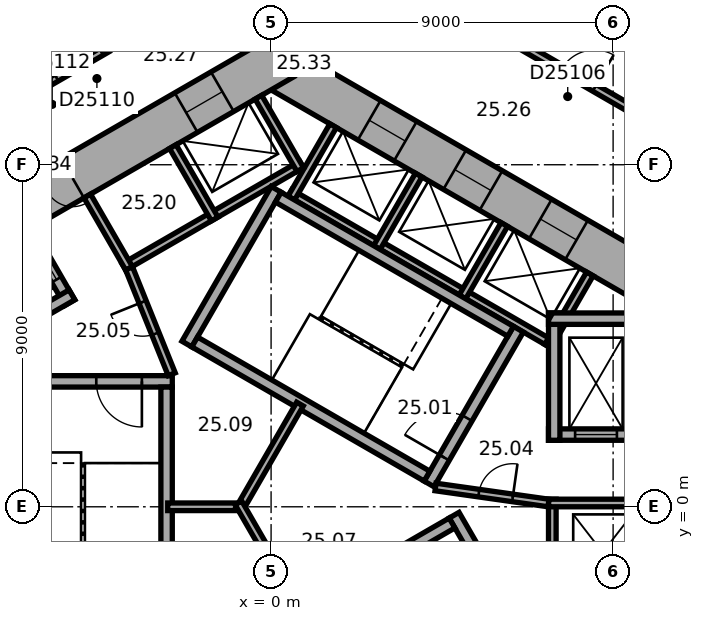
"""IFC4 building model, lengths in metres.
Left out: names, types, materials, properties, quantities, classifications, styles, units other than length and angle.
Written with IfcOpenShell. Run it as: python <this file> out.ifc"""

import sys

from ifc_helpers import new_model, si_unit, direction, frame, frame_2d, origin, place, context, subcontext, project, spatial, rectangle, extrude, element, fill, save


model = new_model("IFC4")
c1 = context("Model", 3, precision=1e-05, world=origin(), true_north=direction((0.0, 1.0)))
c2 = subcontext(c1, "Body", "Model", "MODEL_VIEW")
j1 = project(units=[si_unit("LENGTHUNIT", "METRE"), si_unit("PLANEANGLEUNIT", "RADIAN")], contexts=[c1])
p1 = place(None, origin())
s1 = spatial("IfcSite", under=j1, at=p1, CompositionType="ELEMENT")
p2 = place(p1, origin())
s2 = spatial("IfcBuilding", under=s1, at=p2, CompositionType="ELEMENT")
p3 = place(p2, frame((0.0, 0.0, 106.7)))
s3 = spatial("IfcBuildingStorey", under=s2, at=p3, CompositionType="ELEMENT", Elevation=106.7)
p4 = place(p3, frame((10.4, 5.658, 0.0), z_axis=(0.0, 0.0, 1.0), x_axis=(-0.866021384402, 0.500006961711, 0.0)))
e1 = element("IfcWall", 1, at=p4, inside=s3, PredefinedType="SHEAR", context=c2, shape_type="SweptSolid", body=[
    extrude(rectangle(XDim=12.355, YDim=1.2, at=frame_2d((6.178, 0.0))), origin(), (0.0, 0.0, 1.0), 3.3),
])
p5 = place(p4, frame((2.728, 0.0, 0.0)))
e2 = element("IfcOpeningElement", 2, at=p5, cuts=e1, PredefinedType="OPENING", context=c2, shape_type="SweptSolid", body=[
    extrude(rectangle(XDim=1.1, YDim=2.1, at=frame_2d((0.55, 1.05))), frame((0.0, 0.61, 0.0), z_axis=(0.0, -1.0, 0.0), x_axis=(1.0, 0.0, 0.0)), (0.0, 0.0, 1.0), 1.22),
])
p6 = place(p4, frame((5.328, 0.0, 0.0)))
e3 = element("IfcOpeningElement", 3, at=p6, cuts=e1, PredefinedType="OPENING", context=c2, shape_type="SweptSolid", body=[
    extrude(rectangle(XDim=1.1, YDim=2.1, at=frame_2d((0.55, 1.05))), frame((0.0, 0.61, 0.0), z_axis=(0.0, -1.0, 0.0), x_axis=(1.0, 0.0, 0.0)), (0.0, 0.0, 1.0), 1.22),
])
p7 = place(p4, frame((7.928, 0.0, 0.0)))
e4 = element("IfcOpeningElement", 4, at=p7, cuts=e1, PredefinedType="OPENING", context=c2, shape_type="SweptSolid", body=[
    extrude(rectangle(XDim=1.1, YDim=2.1, at=frame_2d((0.55, 1.05))), frame((0.0, 0.61, 0.0), z_axis=(0.0, -1.0, 0.0), x_axis=(1.0, 0.0, 0.0)), (0.0, 0.0, 1.0), 1.22),
])
p8 = place(p3, frame((0.3, 11.836, 0.0), z_axis=(0.0, 0.0, 1.0), x_axis=(-0.866021384402, -0.500006961711, 0.0)))
e5 = element("IfcWall", 5, at=p8, inside=s3, PredefinedType="SHEAR", context=c2, shape_type="SweptSolid", body=[
    extrude(rectangle(XDim=12.355, YDim=1.2, at=frame_2d((6.178, 0.0))), origin(), (0.0, 0.0, 1.0), 3.3),
])
p9 = place(p8, frame((6.378, 0.0, 0.0)))
e6 = element("IfcOpeningElement", 6, at=p9, cuts=e5, PredefinedType="OPENING", context=c2, shape_type="SweptSolid", body=[
    extrude(rectangle(XDim=1.5, YDim=2.1, at=frame_2d((0.75, 1.05))), frame((0.0, 0.61, 0.0), z_axis=(0.0, -1.0, 0.0), x_axis=(1.0, 0.0, 0.0)), (0.0, 0.0, 1.0), 1.22),
])
p10 = place(p8, frame((1.828, 0.0, 0.0)))
e7 = element("IfcOpeningElement", 7, at=p10, cuts=e5, PredefinedType="OPENING", context=c2, shape_type="SweptSolid", body=[
    extrude(rectangle(XDim=1.1, YDim=2.1, at=frame_2d((0.55, 1.05))), frame((0.0, 0.61, 0.0), z_axis=(0.0, -1.0, 0.0), x_axis=(1.0, 0.0, 0.0)), (0.0, 0.0, 1.0), 1.22),
])
p11 = place(p3, frame((7.4, -5.2, 0.0), z_axis=(0.0, 0.0, 1.0), x_axis=(0.0, 1.0, 0.0)))
e8 = element("IfcWall", 8, at=p11, inside=s3, PredefinedType="PARTITIONING", context=c2, shape_type="SweptSolid", body=[
    extrude(rectangle(XDim=5.4, YDim=0.2, at=frame_2d((2.7, 0.0))), origin(), (0.0, 0.0, 1.0), 3.05),
])
p12 = place(p3, frame((7.3, 0.1, 0.0), z_axis=(0.0, 0.0, 1.0), x_axis=(1.0, 0.0, 0.0)))
e9 = element("IfcWall", 9, at=p12, inside=s3, PredefinedType="PARTITIONING", context=c2, shape_type="SweptSolid", body=[
    extrude(rectangle(XDim=2.2, YDim=0.2, at=frame_2d((1.1, 0.0))), origin(), (0.0, 0.0, 1.0), 3.05),
])
p13 = place(p3, frame((7.424, 4.259, 0.0), z_axis=(0.0, 0.0, 1.0), x_axis=(-0.866026010844, 0.49999894854, 0.0)))
e10 = element("IfcWall", 10, at=p13, inside=s3, PredefinedType="PARTITIONING", context=c2, shape_type="SweptSolid", body=[
    extrude(rectangle(XDim=8.0, YDim=0.2, at=frame_2d((4.0, 0.0))), origin(), (0.0, 0.0, 1.0), 3.05),
])
for number, where, z_axis, x_axis in (
    (11, (7.287, 4.222, 0.0), (0.0, 0.0, 1.0), (0.5, 0.866, 0.0)),
    (12, (5.036, 5.522, 0.0), (0.0, 0.0, 1.0), (0.5, 0.866, 0.0)),
    (13, (2.784, 6.822, 0.0), (0.0, 0.0, 1.0), (0.5, 0.866, 0.0)),
    (14, (0.532, 8.122, 0.0), (0.0, 0.0, 1.0), (0.5, 0.866, 0.0)),
):
    element("IfcWall", number, at=place(p3, frame(where, z_axis=z_axis, x_axis=x_axis)), inside=s3, PredefinedType="PARTITIONING", context=c2, shape_type="SweptSolid", body=[
        extrude(rectangle(XDim=2.2, YDim=0.2, at=frame_2d((1.1, 0.0))), origin(), (0.0, 0.0, 1.0), 3.05),
    ])
p14 = place(p3, frame((0.803, 9.009, 0.0), z_axis=(0.0, 0.0, 1.0), x_axis=(-0.866028230842, -0.499995103361, 0.0)))
e15 = element("IfcWall", 15, at=p14, inside=s3, PredefinedType="PARTITIONING", context=c2, shape_type="SweptSolid", body=[
    extrude(rectangle(XDim=5.4, YDim=0.2, at=frame_2d((2.7, 0.0))), origin(), (0.0, 0.0, 1.0), 3.05),
])
p15 = place(p3, frame((0.767, 8.872, 0.0), z_axis=(0.0, 0.0, 1.0), x_axis=(-0.499994660107, 0.866028486751, 0.0)))
e16 = element("IfcWall", 16, at=p15, inside=s3, PredefinedType="PARTITIONING", context=c2, shape_type="SweptSolid", body=[
    extrude(rectangle(XDim=2.2, YDim=0.2, at=frame_2d((1.1, 0.0))), origin(), (0.0, 0.0, 1.0), 3.05),
])
for number, where, z_axis, x_axis in (
    (17, (-1.485, 7.572, 0.0), (0.0, 0.0, 1.0), (-0.5, 0.866, 0.0)),
    (18, (-3.737, 6.272, 0.0), (0.0, 0.0, 1.0), (-0.5, 0.866, 0.0)),
):
    element("IfcWall", number, at=place(p3, frame(where, z_axis=z_axis, x_axis=x_axis)), inside=s3, PredefinedType="PARTITIONING", context=c2, shape_type="SweptSolid", body=[
        extrude(rectangle(XDim=2.2, YDim=0.2, at=frame_2d((1.1, 0.0))), origin(), (0.0, 0.0, 1.0), 3.05),
    ])
p16 = place(p3, frame((4.158, 0.602, 0.0), z_axis=(0.0, 0.0, 1.0), x_axis=(0.499977259774, 0.866038532462, 0.0)))
e19 = element("IfcWall", 19, at=p16, inside=s3, PredefinedType="SHEAR", context=c2, shape_type="SweptSolid", body=[
    extrude(rectangle(XDim=4.7, YDim=0.3, at=frame_2d((2.35, 0.0))), origin(), (0.0, 0.0, 1.0), 3.05),
])
p17 = place(p16, frame((0.8, 0.0, 0.0)))
e20 = element("IfcOpeningElement", 20, at=p17, cuts=e19, PredefinedType="OPENING", context=c2, shape_type="SweptSolid", body=[
    extrude(rectangle(XDim=1.2, YDim=2.1, at=frame_2d((0.6, 1.05))), frame((0.0, 0.16, 0.0), z_axis=(0.0, -1.0, 0.0), x_axis=(1.0, 0.0, 0.0)), (0.0, 0.0, 1.0), 0.32),
])
p18 = place(p3, frame((-2.216, 4.282, 0.0), z_axis=(0.0, 0.0, 1.0), x_axis=(0.499977259774, 0.866038532462, 0.0)))
e21 = element("IfcWall", 21, at=p18, inside=s3, PredefinedType="SHEAR", context=c2, shape_type="SweptSolid", body=[
    extrude(rectangle(XDim=4.7, YDim=0.3, at=frame_2d((2.35, 0.0))), origin(), (0.0, 0.0, 1.0), 3.05),
])
for number, where, z_axis, x_axis in (
    (22, (4.103, 0.807, 0.0), (0.0, 0.0, 1.0), (-0.866, 0.5, 0.0)),
    (23, (6.303, 4.617, 0.0), (0.0, 0.0, 1.0), (-0.866, 0.5, 0.0)),
):
    element("IfcWall", number, at=place(p3, frame(where, z_axis=z_axis, x_axis=x_axis)), inside=s3, PredefinedType="SHEAR", context=c2, shape_type="SweptSolid", body=[
        extrude(rectangle(XDim=7.06, YDim=0.3, at=frame_2d((3.53, 0.0))), origin(), (0.0, 0.0, 1.0), 3.05),
    ])
p19 = place(p3, frame((-2.6, 3.3, 0.0), z_axis=(0.0, 0.0, 1.0), x_axis=(-1.0, 0.0, 0.0)))
e24 = element("IfcWall", 24, at=p19, inside=s3, PredefinedType="SHEAR", context=c2, shape_type="SweptSolid", body=[
    extrude(rectangle(XDim=4.7, YDim=0.3, at=frame_2d((2.35, 0.0))), origin(), (0.0, 0.0, 1.0), 3.05),
])
p20 = place(p19, frame((0.8, 0.0, 0.0)))
e25 = element("IfcOpeningElement", 25, at=p20, cuts=e24, PredefinedType="OPENING", context=c2, shape_type="SweptSolid", body=[
    extrude(rectangle(XDim=1.2, YDim=2.1, at=frame_2d((0.6, 1.05))), frame((0.0, 0.16, 0.0), z_axis=(0.0, -1.0, 0.0), x_axis=(1.0, 0.0, 0.0)), (0.0, 0.0, 1.0), 0.32),
])
p21 = place(p3, frame((-2.75, 3.15, 0.0), z_axis=(0.0, 0.0, 1.0), x_axis=(0.0, -1.0, 0.0)))
e26 = element("IfcWall", 26, at=p21, inside=s3, PredefinedType="SHEAR", context=c2, shape_type="SweptSolid", body=[
    extrude(rectangle(XDim=7.06, YDim=0.3, at=frame_2d((3.53, 0.0))), origin(), (0.0, 0.0, 1.0), 3.05),
])
p22 = place(p3, frame((4.816, -0.222, 0.0), z_axis=(0.0, 0.0, 1.0), x_axis=(0.499977259774, -0.866038532462, 0.0)))
e27 = element("IfcWall", 27, at=p22, inside=s3, PredefinedType="SHEAR", context=c2, shape_type="SweptSolid", body=[
    extrude(rectangle(XDim=4.7, YDim=0.3, at=frame_2d((2.35, 0.0))), origin(), (0.0, 0.0, 1.0), 3.05),
])
p23 = place(p3, frame((-1.353, -3.957, 0.0), z_axis=(0.0, 0.0, 1.0), x_axis=(0.866027801685, 0.499995846692, 0.0)))
e28 = element("IfcWall", 28, at=p23, inside=s3, PredefinedType="SHEAR", context=c2, shape_type="SweptSolid", body=[
    extrude(rectangle(XDim=7.06, YDim=0.3, at=frame_2d((3.53, 0.0))), origin(), (0.0, 0.0, 1.0), 3.05),
])
p24 = place(p3, frame((7.3, 1.9, 0.0), z_axis=(0.0, 0.0, 1.0), x_axis=(1.0, 0.0, 0.0)))
e29 = element("IfcWall", 29, at=p24, inside=s3, PredefinedType="SHEAR", context=c2, shape_type="SweptSolid", body=[
    extrude(rectangle(XDim=2.2, YDim=0.3, at=frame_2d((1.1, 0.0))), origin(), (0.0, 0.0, 1.0), 3.05),
])
p25 = place(p24, frame((0.7, 0.0, 0.0)))
e30 = element("IfcOpeningElement", 30, at=p25, cuts=e29, PredefinedType="OPENING", context=c2, shape_type="SweptSolid", body=[
    extrude(rectangle(XDim=1.1, YDim=2.1, at=frame_2d((0.55, 1.05))), frame((0.0, 0.16, 0.0), z_axis=(0.0, -1.0, 0.0), x_axis=(1.0, 0.0, 0.0)), (0.0, 0.0, 1.0), 0.32),
])
p26 = place(p3, frame((7.45, 1.75, 0.0), z_axis=(0.0, 0.0, 1.0), x_axis=(0.0, 1.0, 0.0)))
e31 = element("IfcWall", 31, at=p26, inside=s3, PredefinedType="SHEAR", context=c2, shape_type="SweptSolid", body=[
    extrude(rectangle(XDim=3.35, YDim=0.3, at=frame_2d((1.675, 0.0))), origin(), (0.0, 0.0, 1.0), 3.05),
])
p27 = place(p3, frame((7.3, 4.95, 0.0), z_axis=(0.0, 0.0, 1.0), x_axis=(1.0, 0.0, 0.0)))
e32 = element("IfcWall", 32, at=p27, inside=s3, PredefinedType="SHEAR", context=c2, shape_type="SweptSolid", body=[
    extrude(rectangle(XDim=2.2, YDim=0.3, at=frame_2d((1.1, 0.0))), origin(), (0.0, 0.0, 1.0), 3.05),
])
p28 = place(p3, frame((4.327, 0.521, 0.0), z_axis=(0.0, 0.0, 1.0), x_axis=(0.990124376366, -0.14019172346, 0.0)))
e33 = element("IfcWall", 33, at=p28, inside=s3, PredefinedType="PARTITIONING", context=c2, shape_type="SweptSolid", body=[
    extrude(rectangle(XDim=3.002, YDim=0.2, at=frame_2d((1.501, 0.0))), origin(), (0.0, 0.0, 1.0), 3.05),
])
p29 = place(p28, frame((1.15, 0.0, 0.0)))
e34 = element("IfcOpeningElement", 34, at=p29, cuts=e33, PredefinedType="OPENING", context=c2, shape_type="SweptSolid", body=[
    extrude(rectangle(XDim=0.9, YDim=2.1, at=frame_2d((0.45, 1.05))), frame((0.0, 0.11, 0.0), z_axis=(0.0, -1.0, 0.0), x_axis=(1.0, 0.0, 0.0)), (0.0, 0.0, 1.0), 0.22),
])
p30 = place(p3, frame((-5.295, 5.372, 0.0), z_axis=(0.0, 0.0, 1.0), x_axis=(-0.500077893725, 0.86598042715, 0.0)))
e35 = element("IfcWall", 35, at=p30, inside=s3, PredefinedType="SHEAR", context=c2, shape_type="SweptSolid", body=[
    extrude(rectangle(XDim=2.2, YDim=0.3, at=frame_2d((1.1, 0.0))), origin(), (0.0, 0.0, 1.0), 3.05),
])
p31 = place(p30, frame((0.7, 0.0, 0.0)))
e36 = element("IfcOpeningElement", 36, at=p31, cuts=e35, PredefinedType="OPENING", context=c2, shape_type="SweptSolid", body=[
    extrude(rectangle(XDim=1.1, YDim=2.1, at=frame_2d((0.55, 1.05))), frame((0.0, 0.16, 0.0), z_axis=(0.0, -1.0, 0.0), x_axis=(1.0, 0.0, 0.0)), (0.0, 0.0, 1.0), 0.32),
])
p32 = place(p3, frame((-5.24, 5.577, 0.0), z_axis=(0.0, 0.0, 1.0), x_axis=(-0.866014461049, -0.500018952895, 0.0)))
e37 = element("IfcWall", 37, at=p32, inside=s3, PredefinedType="SHEAR", context=c2, shape_type="SweptSolid", body=[
    extrude(rectangle(XDim=3.35, YDim=0.3, at=frame_2d((1.675, 0.0))), origin(), (0.0, 0.0, 1.0), 3.05),
])
p33 = place(p3, frame((-2.615, 3.487, 0.0), z_axis=(0.0, 0.0, 1.0), x_axis=(-0.373576831041, 0.92759924068, 0.0)))
e38 = element("IfcWall", 38, at=p33, inside=s3, PredefinedType="PARTITIONING", context=c2, shape_type="SweptSolid", body=[
    extrude(rectangle(XDim=3.002, YDim=0.2, at=frame_2d((1.501, 0.0))), origin(), (0.0, 0.0, 1.0), 3.05),
])
p34 = place(p33, frame((1.15, 0.0, 0.0)))
e39 = element("IfcOpeningElement", 39, at=p34, cuts=e38, PredefinedType="OPENING", context=c2, shape_type="SweptSolid", body=[
    extrude(rectangle(XDim=0.9, YDim=2.1, at=frame_2d((0.45, 1.05))), frame((0.0, 0.11, 0.0), z_axis=(0.0, -1.0, 0.0), x_axis=(1.0, 0.0, 0.0)), (0.0, 0.0, 1.0), 0.22),
])
p35 = place(p3, frame((-0.68, 0.0, 0.0), z_axis=(0.0, 0.0, 1.0), x_axis=(-1.0, 0.0, 0.0)))
e40 = element("IfcWall", 40, at=p35, inside=s3, PredefinedType="PARTITIONING", context=c2, shape_type="SweptSolid", body=[
    extrude(rectangle(XDim=2.04, YDim=0.2, at=frame_2d((1.02, 0.0))), origin(), (0.0, 0.0, 1.0), 3.05),
])
for number, where, z_axis, x_axis in (
    (41, (-0.86, -0.104, 0.0), (0.0, 0.0, 1.0), (0.5, 0.866, 0.0)),
    (42, (-0.86, 0.104, 0.0), (0.0, 0.0, 1.0), (0.5, -0.866, 0.0)),
):
    element("IfcWall", number, at=place(p3, frame(where, z_axis=z_axis, x_axis=x_axis)), inside=s3, PredefinedType="PARTITIONING", context=c2, shape_type="SweptSolid", body=[
        extrude(rectangle(XDim=3.24, YDim=0.2, at=frame_2d((1.62, 0.0))), origin(), (0.0, 0.0, 1.0), 3.05),
    ])
p36 = place(p3, frame((-10.083, 19.524, 0.0), z_axis=(0.0, 0.0, 1.0), x_axis=(0.499999662836, -0.866025598446, 0.0)))
e43 = element("IfcWall", 43, at=p36, inside=s3, PredefinedType="PARTITIONING", context=c2, shape_type="SweptSolid", body=[
    extrude(rectangle(XDim=9.25, YDim=0.2, at=frame_2d((4.625, 0.0))), origin(), (0.0, 0.0, 1.0), 2.6),
])
p37 = place(p3, frame((-4.309, 12.061, 0.0), z_axis=(0.0, 0.0, 1.0), x_axis=(-0.866020679205, -0.500008183122, 0.0)))
e44 = element("IfcWall", 44, at=p37, inside=s3, PredefinedType="PARTITIONING", context=c2, shape_type="SweptSolid", body=[
    extrude(rectangle(XDim=5.104, YDim=0.2, at=frame_2d((2.552, 0.0))), origin(), (0.0, 0.0, 1.0), 3.05),
])
p38 = place(p37, frame((0.185, 0.0, 0.0)))
e45 = element("IfcOpeningElement", 45, at=p38, cuts=e44, PredefinedType="OPENING", context=c2, shape_type="SweptSolid", body=[
    extrude(rectangle(XDim=0.9, YDim=2.1, at=frame_2d((0.45, 1.05))), frame((0.0, 0.11, 0.0), z_axis=(0.0, -1.0, 0.0), x_axis=(1.0, 0.0, 0.0)), (0.0, 0.0, 1.0), 0.22),
])
p39 = place(p37, frame((1.544, 0.0, 0.0)))
e46 = element("IfcOpeningElement", 46, at=p39, cuts=e44, PredefinedType="OPENING", context=c2, shape_type="SweptSolid", body=[
    extrude(rectangle(XDim=0.9, YDim=2.1, at=frame_2d((0.45, 1.05))), frame((0.0, 0.11, 0.0), z_axis=(0.0, -1.0, 0.0), x_axis=(1.0, 0.0, 0.0)), (0.0, 0.0, 1.0), 0.22),
])
p40 = place(p3, frame((10.885, 9.652, 0.0), z_axis=(0.0, 0.0, 1.0), x_axis=(-0.866033868542, 0.499985338323, 0.0)))
e47 = element("IfcWall", 47, at=p40, inside=s3, PredefinedType="PARTITIONING", context=c2, shape_type="SweptSolid", body=[
    extrude(rectangle(XDim=8.602, YDim=0.2, at=frame_2d((4.301, 0.0))), origin(), (0.0, 0.0, 1.0), 3.05),
])
p41 = place(p40, frame((2.739, 0.0, 0.0)))
e48 = element("IfcOpeningElement", 48, at=p41, cuts=e47, PredefinedType="OPENING", context=c2, shape_type="SweptSolid", body=[
    extrude(rectangle(XDim=1.0, YDim=2.1, at=frame_2d((0.5, 1.05))), frame((0.0, 0.11, 0.0), z_axis=(0.0, -1.0, 0.0), x_axis=(1.0, 0.0, 0.0)), (0.0, 0.0, 1.0), 0.22),
])
p42 = place(p9, origin())
e49 = element("IfcDoor", 49, at=p42, inside=s3, OperationType="DOUBLE_DOOR_SINGLE_SWING", PredefinedType="DOOR", context=c2, shape_type="SweptSolid", body=[
    extrude(rectangle(XDim=1.5, YDim=2.1, at=frame_2d((0.75, 1.05))), frame((0.0, 0.025, 0.0), z_axis=(0.0, -1.0, 0.0), x_axis=(1.0, 0.0, 0.0)), (0.0, 0.0, 1.0), 0.05),
])
fill(e6, e49)
p43 = place(p17, origin())
e50 = element("IfcDoor", 50, at=p43, inside=s3, OperationType="SINGLE_SWING_RIGHT", PredefinedType="DOOR", context=c2, shape_type="SweptSolid", body=[
    extrude(rectangle(XDim=1.2, YDim=2.1, at=frame_2d((0.6, 1.05))), frame((0.0, 0.025, 0.0), z_axis=(0.0, -1.0, 0.0), x_axis=(1.0, 0.0, 0.0)), (0.0, 0.0, 1.0), 0.05),
])
fill(e20, e50)
p44 = place(p20, origin())
e51 = element("IfcDoor", 51, at=p44, inside=s3, OperationType="SINGLE_SWING_RIGHT", PredefinedType="DOOR", context=c2, shape_type="SweptSolid", body=[
    extrude(rectangle(XDim=1.2, YDim=2.1, at=frame_2d((0.6, 1.05))), frame((0.0, 0.025, 0.0), z_axis=(0.0, -1.0, 0.0), x_axis=(1.0, 0.0, 0.0)), (0.0, 0.0, 1.0), 0.05),
])
fill(e25, e51)
p45 = place(p29, origin())
e52 = element("IfcDoor", 52, at=p45, inside=s3, OperationType="SINGLE_SWING_LEFT", PredefinedType="DOOR", context=c2, shape_type="SweptSolid", body=[
    extrude(rectangle(XDim=0.9, YDim=2.1, at=frame_2d((0.45, 1.05))), frame((0.0, 0.025, 0.0), z_axis=(0.0, -1.0, 0.0), x_axis=(1.0, 0.0, 0.0)), (0.0, 0.0, 1.0), 0.05),
])
fill(e34, e52)
p46 = place(p34, origin())
e53 = element("IfcDoor", 53, at=p46, inside=s3, OperationType="SINGLE_SWING_LEFT", PredefinedType="DOOR", context=c2, shape_type="SweptSolid", body=[
    extrude(rectangle(XDim=0.9, YDim=2.1, at=frame_2d((0.45, 1.05))), frame((0.0, 0.025, 0.0), z_axis=(0.0, -1.0, 0.0), x_axis=(1.0, 0.0, 0.0)), (0.0, 0.0, 1.0), 0.05),
])
fill(e39, e53)
p47 = place(p25, origin())
e54 = element("IfcDoor", 54, at=p47, inside=s3, OperationType="DOUBLE_DOOR_SLIDING", PredefinedType="DOOR", context=c2, shape_type="SweptSolid", body=[
    extrude(rectangle(XDim=1.1, YDim=2.1, at=frame_2d((0.55, 1.05))), frame((0.0, 0.025, 0.0), z_axis=(0.0, -1.0, 0.0), x_axis=(1.0, 0.0, 0.0)), (0.0, 0.0, 1.0), 0.05),
])
fill(e30, e54)
p48 = place(p31, origin())
e55 = element("IfcDoor", 55, at=p48, inside=s3, OperationType="DOUBLE_DOOR_SLIDING", PredefinedType="DOOR", context=c2, shape_type="SweptSolid", body=[
    extrude(rectangle(XDim=1.1, YDim=2.1, at=frame_2d((0.55, 1.05))), frame((0.0, 0.025, 0.0), z_axis=(0.0, -1.0, 0.0), x_axis=(1.0, 0.0, 0.0)), (0.0, 0.0, 1.0), 0.05),
])
fill(e36, e55)
p49 = place(p5, origin())
e56 = element("IfcDoor", 56, at=p49, inside=s3, OperationType="DOUBLE_DOOR_SLIDING", PredefinedType="DOOR", context=c2, shape_type="SweptSolid", body=[
    extrude(rectangle(XDim=1.1, YDim=2.1, at=frame_2d((0.55, 1.05))), frame((0.0, 0.025, 0.0), z_axis=(0.0, -1.0, 0.0), x_axis=(1.0, 0.0, 0.0)), (0.0, 0.0, 1.0), 0.05),
])
fill(e2, e56)
p50 = place(p6, origin())
e57 = element("IfcDoor", 57, at=p50, inside=s3, OperationType="DOUBLE_DOOR_SLIDING", PredefinedType="DOOR", context=c2, shape_type="SweptSolid", body=[
    extrude(rectangle(XDim=1.1, YDim=2.1, at=frame_2d((0.55, 1.05))), frame((0.0, 0.025, 0.0), z_axis=(0.0, -1.0, 0.0), x_axis=(1.0, 0.0, 0.0)), (0.0, 0.0, 1.0), 0.05),
])
fill(e3, e57)
p51 = place(p7, origin())
e58 = element("IfcDoor", 58, at=p51, inside=s3, OperationType="DOUBLE_DOOR_SLIDING", PredefinedType="DOOR", context=c2, shape_type="SweptSolid", body=[
    extrude(rectangle(XDim=1.1, YDim=2.1, at=frame_2d((0.55, 1.05))), frame((0.0, 0.025, 0.0), z_axis=(0.0, -1.0, 0.0), x_axis=(1.0, 0.0, 0.0)), (0.0, 0.0, 1.0), 0.05),
])
fill(e4, e58)
p52 = place(p10, origin())
e59 = element("IfcDoor", 59, at=p52, inside=s3, OperationType="DOUBLE_DOOR_SLIDING", PredefinedType="DOOR", context=c2, shape_type="SweptSolid", body=[
    extrude(rectangle(XDim=1.1, YDim=2.1, at=frame_2d((0.55, 1.05))), frame((0.0, 0.025, 0.0), z_axis=(0.0, -1.0, 0.0), x_axis=(1.0, 0.0, 0.0)), (0.0, 0.0, 1.0), 0.05),
])
fill(e7, e59)
p53 = place(p41, origin())
e60 = element("IfcDoor", 60, at=p53, inside=s3, OperationType="SINGLE_SWING_LEFT", PredefinedType="DOOR", context=c2, shape_type="SweptSolid", body=[
    extrude(rectangle(XDim=1.0, YDim=2.1, at=frame_2d((0.5, 1.05))), frame((0.0, 0.025, 0.0), z_axis=(0.0, -1.0, 0.0), x_axis=(1.0, 0.0, 0.0)), (0.0, 0.0, 1.0), 0.05),
])
fill(e48, e60)
p54 = place(p38, origin())
e61 = element("IfcDoor", 61, at=p54, inside=s3, OperationType="SINGLE_SWING_LEFT", PredefinedType="DOOR", context=c2, shape_type="SweptSolid", body=[
    extrude(rectangle(XDim=0.9, YDim=2.1, at=frame_2d((0.45, 1.05))), frame((0.0, 0.025, 0.0), z_axis=(0.0, -1.0, 0.0), x_axis=(1.0, 0.0, 0.0)), (0.0, 0.0, 1.0), 0.05),
])
fill(e45, e61)
p55 = place(p39, origin())
e62 = element("IfcDoor", 62, at=p55, inside=s3, OperationType="SINGLE_SWING_LEFT", PredefinedType="DOOR", context=c2, shape_type="SweptSolid", body=[
    extrude(rectangle(XDim=0.9, YDim=2.1, at=frame_2d((0.45, 1.05))), frame((0.0, 0.025, 0.0), z_axis=(0.0, -1.0, 0.0), x_axis=(1.0, 0.0, 0.0)), (0.0, 0.0, 1.0), 0.05),
])
fill(e46, e62)
save(model, sys.argv[1])
